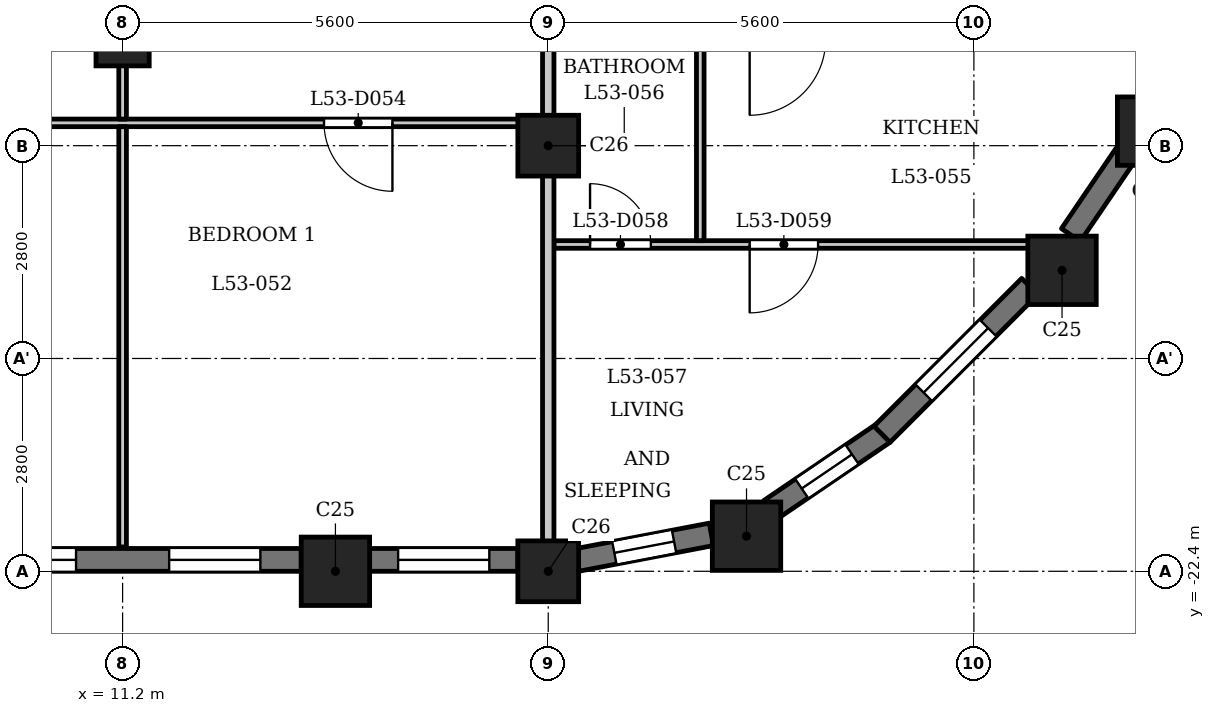
"""IFC4 building model, lengths in metres.
Left out: names, types, materials, properties, quantities, classifications, styles, units other than length and angle.
Written with IfcOpenShell. Run it as: python <this file> out.ifc"""

import sys

from ifc_helpers import new_model, si_unit, direction, frame, frame_2d, origin, origin_2d, place, context, subcontext, project, spatial, rectangle, extrude, element, fill, save


model = new_model("IFC4")
c1 = context("Model", 3, precision=1e-05, world=origin(), true_north=direction((0.0, 1.0)))
c2 = subcontext(c1, "Body", "Model", "MODEL_VIEW")
j1 = project(units=[si_unit("LENGTHUNIT", "METRE"), si_unit("PLANEANGLEUNIT", "RADIAN")], contexts=[c1])
p1 = place(None, origin())
s1 = spatial("IfcSite", under=j1, at=p1, CompositionType="ELEMENT")
p2 = place(p1, origin())
s2 = spatial("IfcBuilding", under=s1, at=p2, CompositionType="ELEMENT")
p3 = place(p2, frame((0.0, 0.0, 206.4)))
s3 = spatial("IfcBuildingStorey", under=s2, at=p3, CompositionType="ELEMENT", Elevation=206.4)
for number, where, z_axis, x_axis in (
    (1, (14.0, -22.4, 0.0), (0.0, 0.0, 1.0), (1.0, 0.0, 0.0)),
    (2, (19.409, -21.938, 0.0), (0.0, 0.0, 1.0), (1.0, 0.0, 0.0)),
    (3, (23.56, -18.44, 0.0), (0.0, 0.0, 1.0), (1.0, 0.0, 0.0)),
    (4, (24.738, -16.609, 0.0), (0.0, 0.0, 1.0), (1.0, 0.0, 0.0)),
):
    element("IfcColumn", number, at=place(p3, frame(where, z_axis=z_axis, x_axis=x_axis)), inside=s3, PredefinedType="COLUMN", context=c2, shape_type="SweptSolid", body=[
        extrude(rectangle(XDim=0.9, YDim=0.9, at=origin_2d()), origin(), (0.0, 0.0, 1.0), 3.5),
    ])
for number, where, z_axis, x_axis in (
    (5, (16.8, -22.4, 0.0), (0.0, 0.0, 1.0), (1.0, 0.0, 0.0)),
    (6, (16.8, -16.8, 0.0), (0.0, 0.0, 1.0), (1.0, 0.0, 0.0)),
):
    element("IfcColumn", number, at=place(p3, frame(where, z_axis=z_axis, x_axis=x_axis)), inside=s3, PredefinedType="COLUMN", context=c2, shape_type="SweptSolid", body=[
        extrude(rectangle(XDim=0.8, YDim=0.8, at=origin_2d()), origin(), (0.0, 0.0, 1.0), 3.5),
    ])
p4 = place(p3, frame((11.2, -15.4, 0.0), z_axis=(0.0, 0.0, 1.0), x_axis=(1.0, 0.0, 0.0)))
e7 = element("IfcColumn", 7, at=p4, inside=s3, PredefinedType="COLUMN", context=c2, shape_type="SweptSolid", body=[
    extrude(rectangle(XDim=0.7, YDim=0.7, at=origin_2d()), origin(), (0.0, 0.0, 1.0), 3.5),
])
p5 = place(p3, frame((8.85, -22.25, 0.0), z_axis=(0.0, 0.0, 1.0), x_axis=(1.0, 0.0, 0.0)))
e8 = element("IfcWall", 8, at=p5, inside=s3, PredefinedType="SOLIDWALL", context=c2, shape_type="SweptSolid", body=[
    extrude(rectangle(XDim=4.7, YDim=0.3, at=frame_2d((2.35, 0.0))), origin(), (0.0, 0.0, 1.0), 2.5),
])
p6 = place(p5, frame((0.538, 0.0, 0.6)))
e9 = element("IfcOpeningElement", 9, at=p6, cuts=e8, PredefinedType="OPENING", context=c2, shape_type="SweptSolid", body=[
    extrude(rectangle(XDim=1.2, YDim=1.55, at=frame_2d((0.6, 0.775))), frame((0.0, 0.16, 0.0), z_axis=(0.0, -1.0, 0.0), x_axis=(1.0, 0.0, 0.0)), (0.0, 0.0, 1.0), 0.32),
])
p7 = place(p5, frame((2.962, 0.0, 0.6)))
e10 = element("IfcOpeningElement", 10, at=p7, cuts=e8, PredefinedType="OPENING", context=c2, shape_type="SweptSolid", body=[
    extrude(rectangle(XDim=1.2, YDim=1.55, at=frame_2d((0.6, 0.775))), frame((0.0, 0.16, 0.0), z_axis=(0.0, -1.0, 0.0), x_axis=(1.0, 0.0, 0.0)), (0.0, 0.0, 1.0), 0.32),
])
p8 = place(p3, frame((14.45, -22.25, 0.0), z_axis=(0.0, 0.0, 1.0), x_axis=(1.0, 0.0, 0.0)))
e11 = element("IfcWall", 11, at=p8, inside=s3, PredefinedType="SOLIDWALL", context=c2, shape_type="SweptSolid", body=[
    extrude(rectangle(XDim=1.95, YDim=0.3, at=frame_2d((0.975, 0.0))), origin(), (0.0, 0.0, 1.0), 2.5),
])
p9 = place(p8, frame((0.375, 0.0, 0.6)))
e12 = element("IfcOpeningElement", 12, at=p9, cuts=e11, PredefinedType="OPENING", context=c2, shape_type="SweptSolid", body=[
    extrude(rectangle(XDim=1.2, YDim=1.55, at=frame_2d((0.6, 0.775))), frame((0.0, 0.16, 0.0), z_axis=(0.0, -1.0, 0.0), x_axis=(1.0, 0.0, 0.0)), (0.0, 0.0, 1.0), 0.32),
])
p10 = place(p3, frame((17.179, -22.251, 0.0), z_axis=(0.0, 0.0, 1.0), x_axis=(0.98230529033, 0.187286722942, 0.0)))
e13 = element("IfcWall", 13, at=p10, inside=s3, PredefinedType="SOLIDWALL", context=c2, shape_type="SweptSolid", body=[
    extrude(rectangle(XDim=1.799, YDim=0.3, at=frame_2d((0.899, 0.0))), origin(), (0.0, 0.0, 1.0), 2.5),
])
p11 = place(p10, frame((0.5, 0.0, 0.6)))
e14 = element("IfcOpeningElement", 14, at=p11, cuts=e13, PredefinedType="OPENING", context=c2, shape_type="SweptSolid", body=[
    extrude(rectangle(XDim=0.8, YDim=1.55, at=frame_2d((0.4, 0.775))), frame((0.0, 0.16, 0.0), z_axis=(0.0, -1.0, 0.0), x_axis=(1.0, 0.0, 0.0)), (0.0, 0.0, 1.0), 0.32),
])
p12 = place(p3, frame((19.719, -21.594, 0.0), z_axis=(0.0, 0.0, 1.0), x_axis=(0.827067282455, 0.562102935673, 0.0)))
e15 = element("IfcWall", 15, at=p12, inside=s3, PredefinedType="SOLIDWALL", context=c2, shape_type="SweptSolid", body=[
    extrude(rectangle(XDim=1.806, YDim=0.3, at=frame_2d((0.903, 0.0))), origin(), (0.0, 0.0, 1.0), 2.5),
])
p13 = place(p12, frame((0.503, 0.0, 0.6)))
e16 = element("IfcOpeningElement", 16, at=p13, cuts=e15, PredefinedType="OPENING", context=c2, shape_type="SweptSolid", body=[
    extrude(rectangle(XDim=0.8, YDim=1.55, at=frame_2d((0.4, 0.775))), frame((0.0, 0.16, 0.0), z_axis=(0.0, -1.0, 0.0), x_axis=(1.0, 0.0, 0.0)), (0.0, 0.0, 1.0), 0.32),
])
p14 = place(p3, frame((21.191, -20.597, 0.0), z_axis=(0.0, 0.0, 1.0), x_axis=(0.707106781187, 0.707106781187, 0.0)))
e17 = element("IfcWall", 17, at=p14, inside=s3, PredefinedType="SOLIDWALL", context=c2, shape_type="SweptSolid", body=[
    extrude(rectangle(XDim=2.75, YDim=0.3, at=frame_2d((1.375, 0.0))), origin(), (0.0, 0.0, 1.0), 2.5),
])
p15 = place(p14, frame((0.775, 0.0, 0.6)))
e18 = element("IfcOpeningElement", 18, at=p15, cuts=e17, PredefinedType="OPENING", context=c2, shape_type="SweptSolid", body=[
    extrude(rectangle(XDim=1.2, YDim=1.55, at=frame_2d((0.6, 0.775))), frame((0.0, 0.16, 0.0), z_axis=(0.0, -1.0, 0.0), x_axis=(1.0, 0.0, 0.0)), (0.0, 0.0, 1.0), 0.32),
])
p16 = place(p3, frame((23.676, -17.975, 0.0), z_axis=(0.0, 0.0, 1.0), x_axis=(0.56200149592, 0.827136215253, 0.0)))
e19 = element("IfcWall", 19, at=p16, inside=s3, PredefinedType="SOLIDWALL", context=c2, shape_type="SweptSolid", body=[
    extrude(rectangle(XDim=1.277, YDim=0.3, at=frame_2d((0.639, 0.0))), origin(), (0.0, 0.0, 1.0), 2.5),
])
p17 = place(p3, frame((16.875, -18.1, 0.0), z_axis=(0.0, 0.0, 1.0), x_axis=(1.0, 0.0, 0.0)))
e20 = element("IfcWall", 20, at=p17, inside=s3, PredefinedType="PARTITIONING", context=c2, shape_type="SweptSolid", body=[
    extrude(rectangle(XDim=6.765, YDim=0.1, at=frame_2d((3.382, 0.0))), origin(), (0.0, 0.0, 1.0), 3.2),
])
p18 = place(p17, frame((0.475, 0.0, 0.0)))
e21 = element("IfcOpeningElement", 21, at=p18, cuts=e20, PredefinedType="OPENING", context=c2, shape_type="SweptSolid", body=[
    extrude(rectangle(XDim=0.8, YDim=2.1, at=frame_2d((0.4, 1.05))), frame((0.0, 0.06, 0.0), z_axis=(0.0, -1.0, 0.0), x_axis=(1.0, 0.0, 0.0)), (0.0, 0.0, 1.0), 0.12),
])
p19 = place(p17, frame((2.575, 0.0, 0.0)))
e22 = element("IfcOpeningElement", 22, at=p19, cuts=e20, PredefinedType="OPENING", context=c2, shape_type="SweptSolid", body=[
    extrude(rectangle(XDim=0.9, YDim=2.1, at=frame_2d((0.45, 1.05))), frame((0.0, 0.06, 0.0), z_axis=(0.0, -1.0, 0.0), x_axis=(1.0, 0.0, 0.0)), (0.0, 0.0, 1.0), 0.12),
])
p20 = place(p3, frame((-16.725, -16.5, 0.0), z_axis=(0.0, 0.0, 1.0), x_axis=(1.0, 0.0, 0.0)))
e23 = element("IfcWall", 23, at=p20, inside=s3, PredefinedType="PARTITIONING", context=c2, shape_type="SweptSolid", body=[
    extrude(rectangle(XDim=33.45, YDim=0.1, at=frame_2d((16.725, 0.0))), origin(), (0.0, 0.0, 1.0), 3.2),
])
p21 = place(p20, frame((4.075, 0.0, 0.0)))
e24 = element("IfcOpeningElement", 24, at=p21, cuts=e23, PredefinedType="OPENING", context=c2, shape_type="SweptSolid", body=[
    extrude(rectangle(XDim=0.9, YDim=2.1, at=frame_2d((0.45, 1.05))), frame((0.0, 0.06, 0.0), z_axis=(0.0, -1.0, 0.0), x_axis=(1.0, 0.0, 0.0)), (0.0, 0.0, 1.0), 0.12),
])
p22 = place(p20, frame((6.175, 0.0, 0.0)))
e25 = element("IfcOpeningElement", 25, at=p22, cuts=e23, PredefinedType="OPENING", context=c2, shape_type="SweptSolid", body=[
    extrude(rectangle(XDim=0.9, YDim=2.1, at=frame_2d((0.45, 1.05))), frame((0.0, 0.06, 0.0), z_axis=(0.0, -1.0, 0.0), x_axis=(1.0, 0.0, 0.0)), (0.0, 0.0, 1.0), 0.12),
])
p23 = place(p20, frame((30.575, 0.0, 0.0)))
e26 = element("IfcOpeningElement", 26, at=p23, cuts=e23, PredefinedType="OPENING", context=c2, shape_type="SweptSolid", body=[
    extrude(rectangle(XDim=0.9, YDim=2.1, at=frame_2d((0.45, 1.05))), frame((0.0, 0.06, 0.0), z_axis=(0.0, -1.0, 0.0), x_axis=(1.0, 0.0, 0.0)), (0.0, 0.0, 1.0), 0.12),
])
p24 = place(p20, frame((22.975, 0.0, 0.0)))
e27 = element("IfcOpeningElement", 27, at=p24, cuts=e23, PredefinedType="OPENING", context=c2, shape_type="SweptSolid", body=[
    extrude(rectangle(XDim=0.9, YDim=2.1, at=frame_2d((0.45, 1.05))), frame((0.0, 0.06, 0.0), z_axis=(0.0, -1.0, 0.0), x_axis=(1.0, 0.0, 0.0)), (0.0, 0.0, 1.0), 0.12),
])
p25 = place(p3, frame((11.2, -22.08, 0.0), z_axis=(0.0, 0.0, 1.0), x_axis=(0.0, 1.0, 0.0)))
e28 = element("IfcWall", 28, at=p25, inside=s3, PredefinedType="PARTITIONING", context=c2, shape_type="SweptSolid", body=[
    extrude(rectangle(XDim=5.53, YDim=0.1, at=frame_2d((2.765, 0.0))), origin(), (0.0, 0.0, 1.0), 3.2),
])
p26 = place(p3, frame((11.2, -16.45, 0.0), z_axis=(0.0, 0.0, 1.0), x_axis=(0.0, 1.0, 0.0)))
e29 = element("IfcWall", 29, at=p26, inside=s3, PredefinedType="PARTITIONING", context=c2, shape_type="SweptSolid", body=[
    extrude(rectangle(XDim=3.175, YDim=0.1, at=frame_2d((1.587, 0.0))), origin(), (0.0, 0.0, 1.0), 3.2),
])
p27 = place(p26, frame((1.699, 0.0, 0.0)))
e30 = element("IfcOpeningElement", 30, at=p27, cuts=e29, PredefinedType="OPENING", context=c2, shape_type="SweptSolid", body=[
    extrude(rectangle(XDim=0.9, YDim=2.1, at=frame_2d((0.45, 1.05))), frame((0.0, 0.06, 0.0), z_axis=(0.0, -1.0, 0.0), x_axis=(1.0, 0.0, 0.0)), (0.0, 0.0, 1.0), 0.12),
])
p28 = place(p3, frame((16.8, -22.31, 0.0), z_axis=(0.0, 0.0, 1.0), x_axis=(0.0, 1.0, 0.0)))
e31 = element("IfcWall", 31, at=p28, inside=s3, PredefinedType="PARTITIONING", context=c2, shape_type="SweptSolid", body=[
    extrude(rectangle(XDim=6.835, YDim=0.15, at=frame_2d((3.417, 0.0))), origin(), (0.0, 0.0, 1.0), 2.55),
])
p29 = place(p3, frame((18.8, -18.05, 0.0), z_axis=(0.0, 0.0, 1.0), x_axis=(0.0, 1.0, 0.0)))
e32 = element("IfcWall", 32, at=p29, inside=s3, PredefinedType="PARTITIONING", context=c2, shape_type="SweptSolid", body=[
    extrude(rectangle(XDim=2.575, YDim=0.1, at=frame_2d((1.288, 0.0))), origin(), (0.0, 0.0, 1.0), 3.2),
])
p30 = place(p23, origin())
e33 = element("IfcDoor", 33, at=p30, inside=s3, OperationType="SINGLE_SWING_RIGHT", PredefinedType="DOOR", context=c2, shape_type="SweptSolid", body=[
    extrude(rectangle(XDim=0.9, YDim=2.1, at=frame_2d((0.45, 1.05))), frame((0.0, 0.025, 0.0), z_axis=(0.0, -1.0, 0.0), x_axis=(1.0, 0.0, 0.0)), (0.0, 0.0, 1.0), 0.05),
])
fill(e26, e33)
p31 = place(p18, origin())
e34 = element("IfcDoor", 34, at=p31, inside=s3, OperationType="SINGLE_SWING_RIGHT", PredefinedType="DOOR", context=c2, shape_type="SweptSolid", body=[
    extrude(rectangle(XDim=0.8, YDim=2.1, at=frame_2d((0.4, 1.05))), frame((0.0, 0.025, 0.0), z_axis=(0.0, -1.0, 0.0), x_axis=(1.0, 0.0, 0.0)), (0.0, 0.0, 1.0), 0.05),
])
fill(e21, e34)
p32 = place(p19, origin())
e35 = element("IfcDoor", 35, at=p32, inside=s3, OperationType="SINGLE_SWING_LEFT", PredefinedType="DOOR", context=c2, shape_type="SweptSolid", body=[
    extrude(rectangle(XDim=0.9, YDim=2.1, at=frame_2d((0.45, 1.05))), frame((0.0, 0.025, 0.0), z_axis=(0.0, -1.0, 0.0), x_axis=(1.0, 0.0, 0.0)), (0.0, 0.0, 1.0), 0.05),
])
fill(e22, e35)
p33 = place(p6, origin())
e36 = element("IfcWindow", 36, at=p33, inside=s3, PartitioningType="SINGLE_PANEL", PredefinedType="WINDOW", context=c2, shape_type="SweptSolid", body=[
    extrude(rectangle(XDim=1.2, YDim=1.55, at=frame_2d((0.6, 0.775))), frame((0.0, 0.03, 0.0), z_axis=(0.0, -1.0, 0.0), x_axis=(1.0, 0.0, 0.0)), (0.0, 0.0, 1.0), 0.06),
])
fill(e9, e36)
p34 = place(p7, origin())
e37 = element("IfcWindow", 37, at=p34, inside=s3, PartitioningType="SINGLE_PANEL", PredefinedType="WINDOW", context=c2, shape_type="SweptSolid", body=[
    extrude(rectangle(XDim=1.2, YDim=1.55, at=frame_2d((0.6, 0.775))), frame((0.0, 0.03, 0.0), z_axis=(0.0, -1.0, 0.0), x_axis=(1.0, 0.0, 0.0)), (0.0, 0.0, 1.0), 0.06),
])
fill(e10, e37)
p35 = place(p9, origin())
e38 = element("IfcWindow", 38, at=p35, inside=s3, PartitioningType="SINGLE_PANEL", PredefinedType="WINDOW", context=c2, shape_type="SweptSolid", body=[
    extrude(rectangle(XDim=1.2, YDim=1.55, at=frame_2d((0.6, 0.775))), frame((0.0, 0.03, 0.0), z_axis=(0.0, -1.0, 0.0), x_axis=(1.0, 0.0, 0.0)), (0.0, 0.0, 1.0), 0.06),
])
fill(e12, e38)
p36 = place(p11, origin())
e39 = element("IfcWindow", 39, at=p36, inside=s3, PartitioningType="SINGLE_PANEL", PredefinedType="WINDOW", context=c2, shape_type="SweptSolid", body=[
    extrude(rectangle(XDim=0.8, YDim=1.55, at=frame_2d((0.4, 0.775))), frame((0.0, 0.03, 0.0), z_axis=(0.0, -1.0, 0.0), x_axis=(1.0, 0.0, 0.0)), (0.0, 0.0, 1.0), 0.06),
])
fill(e14, e39)
p37 = place(p13, origin())
e40 = element("IfcWindow", 40, at=p37, inside=s3, PartitioningType="SINGLE_PANEL", PredefinedType="WINDOW", context=c2, shape_type="SweptSolid", body=[
    extrude(rectangle(XDim=0.8, YDim=1.55, at=frame_2d((0.4, 0.775))), frame((0.0, 0.03, 0.0), z_axis=(0.0, -1.0, 0.0), x_axis=(1.0, 0.0, 0.0)), (0.0, 0.0, 1.0), 0.06),
])
fill(e16, e40)
p38 = place(p15, origin())
e41 = element("IfcWindow", 41, at=p38, inside=s3, PartitioningType="SINGLE_PANEL", PredefinedType="WINDOW", context=c2, shape_type="SweptSolid", body=[
    extrude(rectangle(XDim=1.2, YDim=1.55, at=frame_2d((0.6, 0.775))), frame((0.0, 0.03, 0.0), z_axis=(0.0, -1.0, 0.0), x_axis=(1.0, 0.0, 0.0)), (0.0, 0.0, 1.0), 0.06),
])
fill(e18, e41)
save(model, sys.argv[1])
